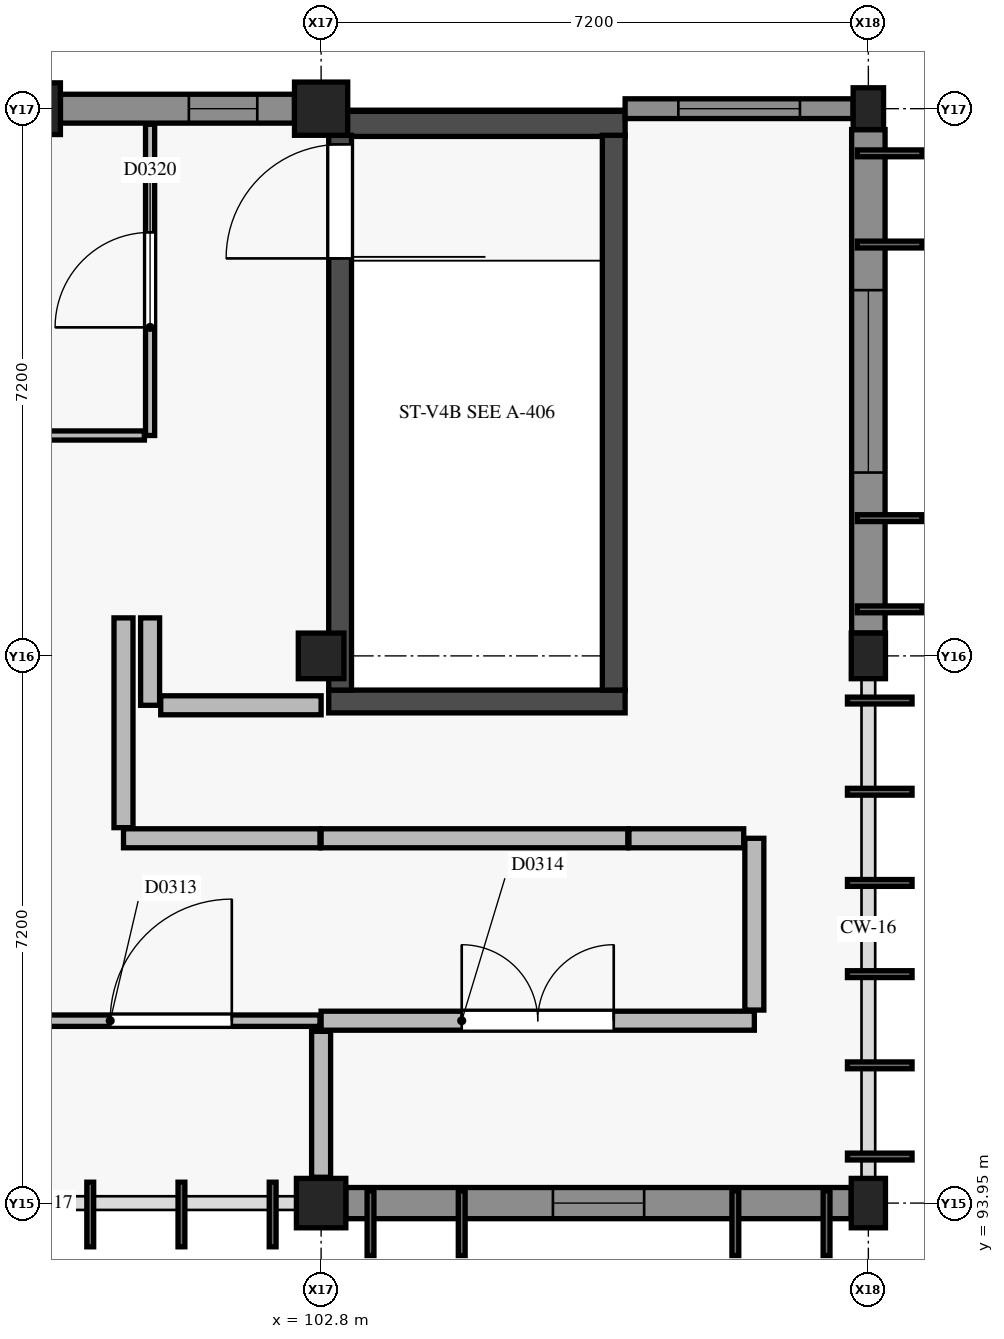
"""IFC4 building model, lengths in metres.
Left out: names, types, materials, properties, quantities, classifications, styles, units other than length and angle.
Written with IfcOpenShell. Run it as: python <this file> out.ifc"""

import sys

from ifc_helpers import new_model, si_unit, direction, frame, frame_2d, origin, origin_2d, place, context, subcontext, project, spatial, rectangle, circle, extrude, element, fill, save


model = new_model("IFC4")
c1 = context("Model", 3, precision=1e-05, world=origin(), true_north=direction((0.0, 1.0)))
c2 = subcontext(c1, "Body", "Model", "MODEL_VIEW")
j1 = project(units=[si_unit("LENGTHUNIT", "METRE"), si_unit("PLANEANGLEUNIT", "RADIAN")], contexts=[c1])
p1 = place(None, origin())
s1 = spatial("IfcSite", under=j1, at=p1, CompositionType="ELEMENT")
p2 = place(p1, origin())
s2 = spatial("IfcBuilding", under=s1, at=p2, CompositionType="ELEMENT")
p3 = place(p2, frame((0.0, 0.0, 21.6)))
s3 = spatial("IfcBuildingStorey", under=s2, at=p3, CompositionType="ELEMENT", Elevation=21.6)
p4 = place(p3, frame((102.8, 93.95, 0.0), z_axis=(0.0, 0.0, 1.0), x_axis=(1.0, 0.0, 0.0)))
e1 = element("IfcColumn", 1, at=p4, inside=s3, PredefinedType="COLUMN", context=c2, shape_type="SweptSolid", body=[
    extrude(rectangle(XDim=0.65, YDim=0.65, at=origin_2d()), origin(), (0.0, 0.0, 1.0), 4.36),
])
p5 = place(p3, frame((102.8, 101.15, 0.0), z_axis=(0.0, 0.0, 1.0), x_axis=(1.0, 0.0, 0.0)))
e2 = element("IfcColumn", 2, at=p5, inside=s3, PredefinedType="COLUMN", context=c2, shape_type="SweptSolid", body=[
    extrude(rectangle(XDim=0.6, YDim=0.6, at=origin_2d()), origin(), (0.0, 0.0, 1.0), 4.05),
])
p6 = place(p3, frame((102.8, 108.35, 0.0), z_axis=(0.0, 0.0, 1.0), x_axis=(1.0, 0.0, 0.0)))
e3 = element("IfcColumn", 3, at=p6, inside=s3, PredefinedType="COLUMN", context=c2, shape_type="SweptSolid", body=[
    extrude(circle(Radius=0.35, at=origin_2d()), origin(), (0.0, 0.0, 1.0), 4.36),
])
p7 = place(p3, frame((110.0, 93.95, 0.0), z_axis=(0.0, 0.0, 1.0), x_axis=(1.0, 0.0, 0.0)))
e4 = element("IfcColumn", 4, at=p7, inside=s3, PredefinedType="COLUMN", context=c2, shape_type="SweptSolid", body=[
    extrude(rectangle(XDim=0.45, YDim=0.65, at=origin_2d()), origin(), (0.0, 0.0, 1.0), 4.36),
])
p8 = place(p3, frame((110.0, 101.15, 0.0), z_axis=(0.0, 0.0, 1.0), x_axis=(1.0, 0.0, 0.0)))
e5 = element("IfcColumn", 5, at=p8, inside=s3, PredefinedType="COLUMN", context=c2, shape_type="SweptSolid", body=[
    extrude(rectangle(XDim=0.45, YDim=0.6, at=origin_2d()), origin(), (0.0, 0.0, 1.0), 4.05),
])
p9 = place(p3, frame((110.0, 108.35, 0.0), z_axis=(0.0, 0.0, 1.0), x_axis=(1.0, 0.0, 0.0)))
e6 = element("IfcColumn", 6, at=p9, inside=s3, PredefinedType="COLUMN", context=c2, shape_type="SweptSolid", body=[
    extrude(rectangle(XDim=0.4, YDim=0.55, at=origin_2d()), origin(), (0.0, 0.0, 1.0), 4.36),
])
p10 = place(p3, frame((99.2, 108.35, 0.0), z_axis=(0.0, 0.0, 1.0), x_axis=(1.0, 0.0, 0.0)))
e7 = element("IfcColumn", 7, at=p10, inside=s3, PredefinedType="PILASTER", context=c2, shape_type="SweptSolid", body=[
    extrude(rectangle(XDim=0.34, YDim=0.68, at=origin_2d()), origin(), (0.0, 0.0, 1.0), 4.2),
])
p11 = place(p3, frame((102.9, 100.55, 0.0), z_axis=(0.0, 0.0, 1.0), x_axis=(1.0, 0.0, 0.0)))
e8 = element("IfcWall", 8, at=p11, inside=s3, PredefinedType="SHEAR", context=c2, shape_type="SweptSolid", body=[
    extrude(rectangle(XDim=3.9, YDim=0.3, at=frame_2d((1.95, 0.0))), origin(), (0.0, 0.0, 1.0), 4.02),
])
p12 = place(p3, frame((102.9, 108.15, 0.0), z_axis=(0.0, 0.0, 1.0), x_axis=(1.0, 0.0, 0.0)))
e9 = element("IfcWall", 9, at=p12, inside=s3, PredefinedType="SHEAR", context=c2, shape_type="SweptSolid", body=[
    extrude(rectangle(XDim=3.9, YDim=0.33, at=frame_2d((1.95, 0.0))), origin(), (0.0, 0.0, 1.0), 4.02),
])
p13 = place(p3, frame((103.05, 100.7, 0.0), z_axis=(0.0, 0.0, 1.0), x_axis=(0.0, 1.0, 0.0)))
e10 = element("IfcWall", 10, at=p13, inside=s3, PredefinedType="SHEAR", context=c2, shape_type="SweptSolid", body=[
    extrude(rectangle(XDim=7.3, YDim=0.3, at=frame_2d((3.65, 0.0))), origin(), (0.0, 0.0, 1.0), 4.02),
])
p14 = place(p13, frame((5.68, 0.0, 0.0)))
e11 = element("IfcOpeningElement", 11, at=p14, cuts=e10, PredefinedType="OPENING", context=c2, shape_type="SweptSolid", body=[
    extrude(rectangle(XDim=1.5, YDim=2.15, at=frame_2d((0.75, 1.075))), frame((0.0, 0.16, 0.0), z_axis=(0.0, -1.0, 0.0), x_axis=(1.0, 0.0, 0.0)), (0.0, 0.0, 1.0), 0.32),
])
p15 = place(p3, frame((106.65, 100.7, 0.0), z_axis=(0.0, 0.0, 1.0), x_axis=(0.0, 1.0, 0.0)))
e12 = element("IfcWall", 12, at=p15, inside=s3, PredefinedType="SHEAR", context=c2, shape_type="SweptSolid", body=[
    extrude(rectangle(XDim=7.3, YDim=0.3, at=frame_2d((3.65, 0.0))), origin(), (0.0, 0.0, 1.0), 4.02),
])
p16 = place(p3, frame((99.37, 108.35, 0.0), z_axis=(0.0, 0.0, 1.0), x_axis=(1.0, 0.0, 0.0)))
e13 = element("IfcWall", 13, at=p16, inside=s3, PredefinedType="USERDEFINED", context=c2, shape_type="SweptSolid", body=[
    extrude(rectangle(XDim=3.08, YDim=0.38, at=frame_2d((1.54, 0.0))), origin(), (0.0, 0.0, 1.0), 3.38),
])
p17 = place(p16, frame((1.69, 0.0, 0.95)))
e14 = element("IfcOpeningElement", 14, at=p17, cuts=e13, PredefinedType="OPENING", context=c2, shape_type="SweptSolid", body=[
    extrude(rectangle(XDim=0.9, YDim=1.2, at=frame_2d((0.45, 0.6))), frame((0.0, 0.2, 0.0), z_axis=(0.0, -1.0, 0.0), x_axis=(1.0, 0.0, 0.0)), (0.0, 0.0, 1.0), 0.4),
])
p18 = place(p3, frame((106.8, 108.35, 0.0), z_axis=(0.0, 0.0, 1.0), x_axis=(1.0, 0.0, 0.0)))
e15 = element("IfcWall", 15, at=p18, inside=s3, PredefinedType="SOLIDWALL", context=c2, shape_type="SweptSolid", body=[
    extrude(rectangle(XDim=3.0, YDim=0.26, at=frame_2d((1.5, 0.0))), origin(), (0.0, 0.0, 1.0), 3.38),
])
p19 = place(p18, frame((0.7, 0.0, 0.6)))
e16 = element("IfcOpeningElement", 16, at=p19, cuts=e15, PredefinedType="OPENING", context=c2, shape_type="SweptSolid", body=[
    extrude(rectangle(XDim=1.6, YDim=2.2, at=frame_2d((0.8, 1.1))), frame((0.0, 0.14, 0.0), z_axis=(0.0, -1.0, 0.0), x_axis=(1.0, 0.0, 0.0)), (0.0, 0.0, 1.0), 0.28),
])
p20 = place(p3, frame((110.0, 108.075, 0.0), z_axis=(0.0, 0.0, 1.0), x_axis=(0.0, -1.0, 0.0)))
e17 = element("IfcWall", 17, at=p20, inside=s3, PredefinedType="USERDEFINED", context=c2, shape_type="SweptSolid", body=[
    extrude(rectangle(XDim=6.625, YDim=0.44, at=frame_2d((3.312, 0.0))), origin(), (0.0, 0.0, 1.0), 3.38),
])
p21 = place(p20, frame((2.113, 0.0, 0.9)))
e18 = element("IfcOpeningElement", 18, at=p21, cuts=e17, PredefinedType="OPENING", context=c2, shape_type="SweptSolid", body=[
    extrude(rectangle(XDim=2.4, YDim=1.5, at=frame_2d((1.2, 0.75))), frame((0.0, 0.23, 0.0), z_axis=(0.0, -1.0, 0.0), x_axis=(1.0, 0.0, 0.0)), (0.0, 0.0, 1.0), 0.46),
])
p22 = place(p3, frame((109.775, 93.95, 0.0), z_axis=(0.0, 0.0, 1.0), x_axis=(-1.0, 0.0, 0.0)))
e19 = element("IfcWall", 19, at=p22, inside=s3, PredefinedType="USERDEFINED", context=c2, shape_type="SweptSolid", body=[
    extrude(rectangle(XDim=6.65, YDim=0.41, at=frame_2d((3.325, 0.0))), origin(), (0.0, 0.0, 1.0), 3.37),
])
p23 = place(p22, frame((2.725, 0.0, 0.6)))
e20 = element("IfcOpeningElement", 20, at=p23, cuts=e19, PredefinedType="OPENING", context=c2, shape_type="SweptSolid", body=[
    extrude(rectangle(XDim=1.2, YDim=2.2, at=frame_2d((0.6, 1.1))), frame((0.0, 0.215, 0.0), z_axis=(0.0, -1.0, 0.0), x_axis=(1.0, 0.0, 0.0)), (0.0, 0.0, 1.0), 0.43),
])
p24 = place(p3, frame((100.55, 100.5, 0.0), z_axis=(0.0, 0.0, 1.0), x_axis=(0.0, 1.0, 0.0)))
e21 = element("IfcWall", 21, at=p24, inside=s3, PredefinedType="PARTITIONING", context=c2, shape_type="SweptSolid", body=[
    extrude(rectangle(XDim=1.15, YDim=0.25, at=frame_2d((0.575, 0.0))), origin(), (0.0, 0.0, 1.0), 3.44),
])
p25 = place(p3, frame((100.69, 100.5, 0.0), z_axis=(0.0, 0.0, 1.0), x_axis=(1.0, 0.0, 0.0)))
e22 = element("IfcWall", 22, at=p25, inside=s3, PredefinedType="PARTITIONING", context=c2, shape_type="SweptSolid", body=[
    extrude(rectangle(XDim=2.11, YDim=0.25, at=frame_2d((1.055, 0.0))), origin(), (0.0, 0.0, 1.0), 3.32),
])
p26 = place(p3, frame((102.8, 96.35, 0.0), z_axis=(0.0, 0.0, 1.0), x_axis=(1.0, 0.0, 0.0)))
e23 = element("IfcWall", 23, at=p26, inside=s3, PredefinedType="PARTITIONING", context=c2, shape_type="SweptSolid", body=[
    extrude(rectangle(XDim=5.7, YDim=0.25, at=frame_2d((2.85, 0.0))), origin(), (0.0, 0.0, 1.0), 3.32),
])
p27 = place(p26, frame((1.85, 0.0, 0.0)))
e24 = element("IfcOpeningElement", 24, at=p27, cuts=e23, PredefinedType="OPENING", context=c2, shape_type="SweptSolid", body=[
    extrude(rectangle(XDim=2.0, YDim=2.4, at=frame_2d((1.0, 1.2))), frame((0.0, 0.135, 0.0), z_axis=(0.0, -1.0, 0.0), x_axis=(1.0, 0.0, 0.0)), (0.0, 0.0, 1.0), 0.27),
])
p28 = place(p3, frame((108.5, 96.49, 0.0), z_axis=(0.0, 0.0, 1.0), x_axis=(0.0, 1.0, 0.0)))
e25 = element("IfcWall", 25, at=p28, inside=s3, PredefinedType="PARTITIONING", context=c2, shape_type="SweptSolid", body=[
    extrude(rectangle(XDim=2.26, YDim=0.25, at=frame_2d((1.13, 0.0))), origin(), (0.0, 0.0, 1.0), 3.95),
])
p29 = place(p3, frame((106.85, 98.75, 0.0), z_axis=(0.0, 0.0, 1.0), x_axis=(1.0, 0.0, 0.0)))
e26 = element("IfcWall", 26, at=p29, inside=s3, PredefinedType="PARTITIONING", context=c2, shape_type="SweptSolid", body=[
    extrude(rectangle(XDim=1.51, YDim=0.25, at=frame_2d((0.755, 0.0))), origin(), (0.0, 0.0, 1.0), 3.95),
])
p30 = place(p3, frame((102.8, 98.75, 0.0), z_axis=(0.0, 0.0, 1.0), x_axis=(1.0, 0.0, 0.0)))
e27 = element("IfcWall", 27, at=p30, inside=s3, PredefinedType="PARTITIONING", context=c2, shape_type="SweptSolid", body=[
    extrude(rectangle(XDim=4.035, YDim=0.25, at=frame_2d((2.018, 0.0))), origin(), (0.0, 0.0, 1.0), 3.32),
])
p31 = place(p3, frame((100.2, 98.75, 0.0), z_axis=(0.0, 0.0, 1.0), x_axis=(1.0, 0.0, 0.0)))
e28 = element("IfcWall", 28, at=p31, inside=s3, PredefinedType="PARTITIONING", context=c2, shape_type="SweptSolid", body=[
    extrude(rectangle(XDim=2.585, YDim=0.25, at=frame_2d((1.292, 0.0))), origin(), (0.0, 0.0, 1.0), 3.32),
])
p32 = place(p3, frame((100.2, 98.89, 0.0), z_axis=(0.0, 0.0, 1.0), x_axis=(0.0, 1.0, 0.0)))
e29 = element("IfcWall", 29, at=p32, inside=s3, PredefinedType="PARTITIONING", context=c2, shape_type="SweptSolid", body=[
    extrude(rectangle(XDim=2.76, YDim=0.25, at=frame_2d((1.38, 0.0))), origin(), (0.0, 0.0, 1.0), 3.44),
])
p33 = place(p3, frame((98.865, 96.35, 0.0), z_axis=(0.0, 0.0, 1.0), x_axis=(1.0, 0.0, 0.0)))
e30 = element("IfcWall", 30, at=p33, inside=s3, PredefinedType="PARTITIONING", context=c2, shape_type="SweptSolid", body=[
    extrude(rectangle(XDim=3.92, YDim=0.15, at=frame_2d((1.96, 0.0))), origin(), (0.0, 0.0, 1.0), 3.32),
])
p34 = place(p33, frame((1.16, 0.0, 0.0)))
e31 = element("IfcOpeningElement", 31, at=p34, cuts=e30, PredefinedType="OPENING", context=c2, shape_type="SweptSolid", body=[
    extrude(rectangle(XDim=1.6, YDim=2.25, at=frame_2d((0.8, 1.125))), frame((0.0, 0.085, 0.0), z_axis=(0.0, -1.0, 0.0), x_axis=(1.0, 0.0, 0.0)), (0.0, 0.0, 1.0), 0.17),
])
p35 = place(p3, frame((100.55, 104.05, 0.0), z_axis=(0.0, 0.0, 1.0), x_axis=(0.0, 1.0, 0.0)))
e32 = element("IfcWall", 32, at=p35, inside=s3, PredefinedType="PARTITIONING", context=c2, shape_type="SweptSolid", body=[
    extrude(rectangle(XDim=4.095, YDim=0.12, at=frame_2d((2.047, 0.0))), origin(), (0.0, 0.0, 1.0), 3.95),
])
p36 = place(p35, frame((1.423, 0.0, 0.0)))
e33 = element("IfcOpeningElement", 33, at=p36, cuts=e32, PredefinedType="OPENING", context=c2, shape_type="SweptSolid", body=[
    extrude(rectangle(XDim=1.25, YDim=2.15, at=frame_2d((0.625, 1.075))), frame((0.0, 0.07, 0.0), z_axis=(0.0, -1.0, 0.0), x_axis=(1.0, 0.0, 0.0)), (0.0, 0.0, 1.0), 0.14),
])
p37 = place(p3, frame((98.85, 104.05, 0.0), z_axis=(0.0, 0.0, 1.0), x_axis=(1.0, 0.0, 0.0)))
e34 = element("IfcWall", 34, at=p37, inside=s3, PredefinedType="PARTITIONING", context=c2, shape_type="SweptSolid", body=[
    extrude(rectangle(XDim=1.625, YDim=0.12, at=frame_2d((0.812, 0.0))), origin(), (0.0, 0.0, 1.0), 3.95),
])
p38 = place(p3, frame((102.8, 94.29, 0.0), z_axis=(0.0, 0.0, 1.0), x_axis=(0.0, 1.0, 0.0)))
e35 = element("IfcWall", 35, at=p38, inside=s3, PredefinedType="PARTITIONING", context=c2, shape_type="SweptSolid", body=[
    extrude(rectangle(XDim=1.92, YDim=0.25, at=frame_2d((0.96, 0.0))), origin(), (0.0, 0.0, 1.0), 3.32),
])
p39 = place(p17, origin())
e36 = element("IfcWindow", 36, at=p39, inside=s3, PartitioningType="SINGLE_PANEL", PredefinedType="WINDOW", context=c2, shape_type="SweptSolid", body=[
    extrude(rectangle(XDim=0.9, YDim=1.2, at=frame_2d((0.45, 0.6))), frame((0.0, 0.03, 0.0), z_axis=(0.0, -1.0, 0.0), x_axis=(1.0, 0.0, 0.0)), (0.0, 0.0, 1.0), 0.06),
])
fill(e14, e36)
p40 = place(p19, origin())
e37 = element("IfcWindow", 37, at=p40, inside=s3, PartitioningType="SINGLE_PANEL", PredefinedType="WINDOW", context=c2, shape_type="SweptSolid", body=[
    extrude(rectangle(XDim=1.6, YDim=2.2, at=frame_2d((0.8, 1.1))), frame((0.0, 0.03, 0.0), z_axis=(0.0, -1.0, 0.0), x_axis=(1.0, 0.0, 0.0)), (0.0, 0.0, 1.0), 0.06),
])
fill(e16, e37)
p41 = place(p21, origin())
e38 = element("IfcWindow", 38, at=p41, inside=s3, PartitioningType="SINGLE_PANEL", PredefinedType="WINDOW", context=c2, shape_type="SweptSolid", body=[
    extrude(rectangle(XDim=2.4, YDim=1.5, at=frame_2d((1.2, 0.75))), frame((0.0, 0.03, 0.0), z_axis=(0.0, -1.0, 0.0), x_axis=(1.0, 0.0, 0.0)), (0.0, 0.0, 1.0), 0.06),
])
fill(e18, e38)
p42 = place(p23, origin())
e39 = element("IfcWindow", 39, at=p42, inside=s3, PartitioningType="SINGLE_PANEL", PredefinedType="WINDOW", context=c2, shape_type="SweptSolid", body=[
    extrude(rectangle(XDim=1.2, YDim=2.2, at=frame_2d((0.6, 1.1))), frame((0.0, 0.03, 0.0), z_axis=(0.0, -1.0, 0.0), x_axis=(1.0, 0.0, 0.0)), (0.0, 0.0, 1.0), 0.06),
])
fill(e20, e39)
p43 = place(p14, origin())
e40 = element("IfcDoor", 40, at=p43, inside=s3, OperationType="SINGLE_SWING_LEFT", PredefinedType="DOOR", context=c2, shape_type="SweptSolid", body=[
    extrude(rectangle(XDim=1.5, YDim=2.15, at=frame_2d((0.75, 1.075))), frame((0.0, 0.025, 0.0), z_axis=(0.0, -1.0, 0.0), x_axis=(1.0, 0.0, 0.0)), (0.0, 0.0, 1.0), 0.05),
])
fill(e11, e40)
p44 = place(p34, origin())
e41 = element("IfcDoor", 41, at=p44, inside=s3, OperationType="SINGLE_SWING_RIGHT", PredefinedType="DOOR", context=c2, shape_type="SweptSolid", body=[
    extrude(rectangle(XDim=1.6, YDim=2.25, at=frame_2d((0.8, 1.125))), frame((0.0, 0.025, 0.0), z_axis=(0.0, -1.0, 0.0), x_axis=(1.0, 0.0, 0.0)), (0.0, 0.0, 1.0), 0.05),
])
fill(e31, e41)
p45 = place(p27, origin())
e42 = element("IfcDoor", 42, at=p45, inside=s3, OperationType="DOUBLE_DOOR_SINGLE_SWING", PredefinedType="DOOR", context=c2, shape_type="SweptSolid", body=[
    extrude(rectangle(XDim=2.0, YDim=2.4, at=frame_2d((1.0, 1.2))), frame((0.0, 0.025, 0.0), z_axis=(0.0, -1.0, 0.0), x_axis=(1.0, 0.0, 0.0)), (0.0, 0.0, 1.0), 0.05),
])
fill(e24, e42)
p46 = place(p36, origin())
e43 = element("IfcDoor", 43, at=p46, inside=s3, OperationType="SINGLE_SWING_LEFT", PredefinedType="DOOR", context=c2, shape_type="SweptSolid", body=[
    extrude(rectangle(XDim=1.25, YDim=2.15, at=frame_2d((0.625, 1.075))), frame((0.0, 0.025, 0.0), z_axis=(0.0, -1.0, 0.0), x_axis=(1.0, 0.0, 0.0)), (0.0, 0.0, 1.0), 0.05),
])
fill(e33, e43)
save(model, sys.argv[1])
